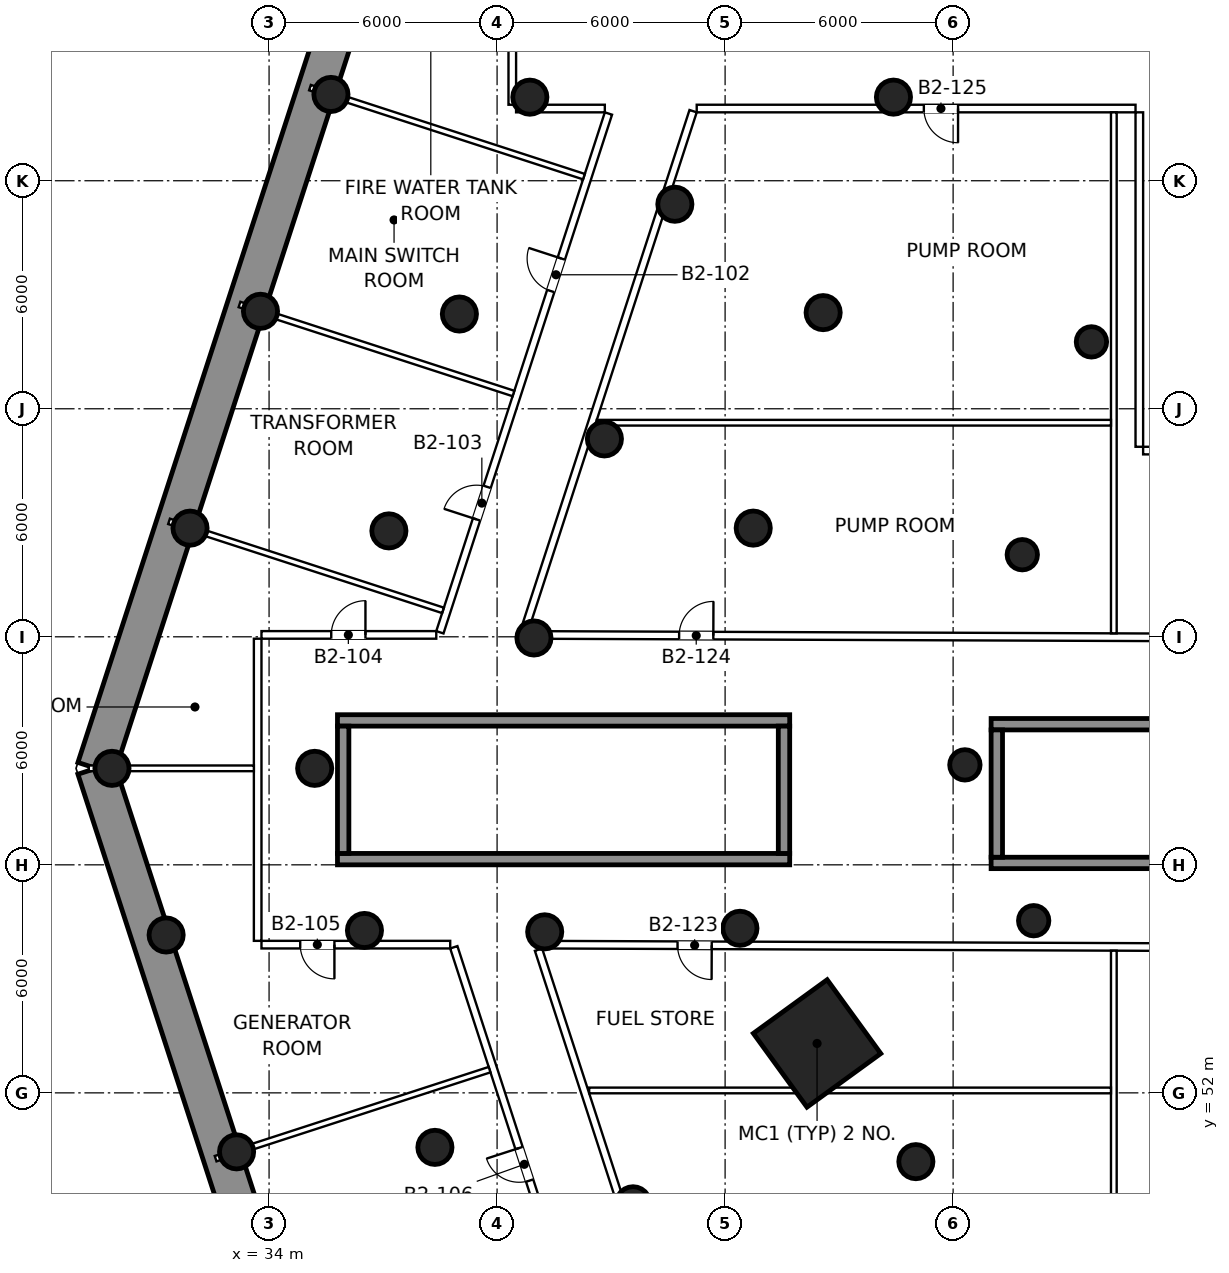
"""IFC4 building model, lengths in metres.
Left out: names, types, materials, properties, quantities, classifications, styles, units other than length and angle.
Written with IfcOpenShell. Run it as: python <this file> out.ifc"""

import sys

from ifc_helpers import new_model, si_unit, direction, frame, frame_2d, origin, origin_2d, place, context, subcontext, project, spatial, rectangle, circle, extrude, element, fill, save


model = new_model("IFC4")
c1 = context("Model", 3, precision=1e-05, world=origin(), true_north=direction((0.0, 1.0)))
c2 = subcontext(c1, "Body", "Model", "MODEL_VIEW")
j1 = project(units=[si_unit("LENGTHUNIT", "METRE"), si_unit("PLANEANGLEUNIT", "RADIAN")], contexts=[c1])
p1 = place(None, origin())
s1 = spatial("IfcSite", under=j1, at=p1, CompositionType="ELEMENT")
p2 = place(p1, origin())
s2 = spatial("IfcBuilding", under=s1, at=p2, CompositionType="ELEMENT")
p3 = place(p2, frame((0.0, 0.0, -10.0)))
s3 = spatial("IfcBuildingStorey", under=s2, at=p3, CompositionType="ELEMENT", Elevation=-10.0)
p4 = place(p3, frame((35.156, 42.963, 0.0), z_axis=(0.0, 0.0, 1.0), x_axis=(-0.309001835939, 0.951061441436, 0.0)))
e1 = element("IfcWall", 1, at=p4, inside=s3, PredefinedType="SOLIDWALL", context=c2, shape_type="SweptSolid", body=[
    extrude(rectangle(XDim=18.481, YDim=1.0, at=frame_2d((9.241, 0.0))), origin(), (0.0, 0.0, 1.0), 4.65),
])
p5 = place(p3, frame((29.446, 60.539, 0.0), z_axis=(0.0, 0.0, 1.0), x_axis=(0.309015382076, 0.951057040161, 0.0)))
e2 = element("IfcWall", 2, at=p5, inside=s3, PredefinedType="SOLIDWALL", context=c2, shape_type="SweptSolid", body=[
    extrude(rectangle(XDim=28.348, YDim=1.0, at=frame_2d((14.174, 0.0))), origin(), (0.0, 0.0, 1.0), 4.65),
])
p6 = place(p3, frame((46.39, 56.33, 0.0), z_axis=(0.0, 0.0, 1.0), x_axis=(1.0, 0.0, 0.0)))
e3 = element("IfcColumn", 3, at=p6, inside=s3, PredefinedType="COLUMN", context=c2, shape_type="SweptSolid", body=[
    extrude(circle(Radius=0.45, at=origin_2d()), origin(), (0.0, 0.0, 1.0), 5.0),
])
p7 = place(p3, frame((48.42, 53.3, 0.0), z_axis=(0.0, 0.0, 1.0), x_axis=(-0.809016994375, -0.587785252292, 0.0)))
e4 = element("IfcColumn", 4, at=p7, inside=s3, PredefinedType="COLUMN", context=c2, shape_type="SweptSolid", body=[
    extrude(rectangle(XDim=2.4, YDim=2.4, at=origin_2d()), origin(), (0.0, 0.0, 1.0), 5.0),
])
for number, where, z_axis, x_axis in (
    (5, (51.02, 50.19, 0.0), (0.0, 0.0, 1.0), (1.0, 0.0, 0.0)),
    (6, (50.43, 78.2, 0.0), (0.0, 0.0, 1.0), (1.0, 0.0, 0.0)),
    (7, (48.58, 72.53, 0.0), (0.0, 0.0, 1.0), (1.0, 0.0, 0.0)),
    (8, (46.74, 66.86, 0.0), (0.0, 0.0, 1.0), (1.0, 0.0, 0.0)),
):
    element("IfcColumn", number, at=place(p3, frame(where, z_axis=z_axis, x_axis=x_axis)), inside=s3, PredefinedType="COLUMN", context=c2, shape_type="SweptSolid", body=[
        extrude(circle(Radius=0.45, at=origin_2d()), origin(), (0.0, 0.0, 1.0), 5.0),
    ])
for number, where, z_axis, x_axis in (
    (9, (52.31, 60.63, 0.0), (0.0, 0.0, 1.0), (1.0, 0.0, 0.0)),
    (10, (54.12, 56.53, 0.0), (0.0, 0.0, 1.0), (1.0, 0.0, 0.0)),
    (11, (55.64, 71.76, 0.0), (0.0, 0.0, 1.0), (1.0, 0.0, 0.0)),
    (12, (53.82, 66.16, 0.0), (0.0, 0.0, 1.0), (1.0, 0.0, 0.0)),
):
    element("IfcColumn", number, at=place(p3, frame(where, z_axis=z_axis, x_axis=x_axis)), inside=s3, PredefinedType="COLUMN", context=c2, shape_type="SweptSolid", body=[
        extrude(circle(Radius=0.4, at=origin_2d()), origin(), (0.0, 0.0, 1.0), 5.0),
    ])
for number, where, z_axis, x_axis in (
    (13, (29.866, 60.539, 0.0), (0.0, 0.0, 1.0), (1.0, 0.0, 0.0)),
    (14, (31.291, 56.154, 0.0), (0.0, 0.0, 1.0), (1.0, 0.0, 0.0)),
    (15, (33.145, 50.448, 0.0), (0.0, 0.0, 1.0), (1.0, 0.0, 0.0)),
    (16, (35.628, 78.271, 0.0), (0.0, 0.0, 1.0), (1.0, 0.0, 0.0)),
    (17, (33.774, 72.565, 0.0), (0.0, 0.0, 1.0), (1.0, 0.0, 0.0)),
    (18, (31.92, 66.859, 0.0), (0.0, 0.0, 1.0), (1.0, 0.0, 0.0)),
    (19, (35.2, 60.539, 0.0), (0.0, 0.0, 1.0), (1.0, 0.0, 0.0)),
    (20, (36.51, 56.273, 0.0), (0.0, 0.0, 1.0), (1.0, 0.0, 0.0)),
    (21, (38.364, 50.566, 0.0), (0.0, 0.0, 1.0), (1.0, 0.0, 0.0)),
    (22, (40.862, 78.199, 0.0), (0.0, 0.0, 1.0), (1.0, 0.0, 0.0)),
    (23, (39.008, 72.493, 0.0), (0.0, 0.0, 1.0), (1.0, 0.0, 0.0)),
    (24, (37.153, 66.787, 0.0), (0.0, 0.0, 1.0), (1.0, 0.0, 0.0)),
    (25, (41.253, 56.237, 0.0), (0.0, 0.0, 1.0), (1.0, 0.0, 0.0)),
    (26, (43.578, 49.081, 0.0), (0.0, 0.0, 1.0), (1.0, 0.0, 0.0)),
    (27, (44.678, 75.382, 0.0), (0.0, 0.0, 1.0), (1.0, 0.0, 0.0)),
    (28, (42.824, 69.207, 0.0), (0.0, 0.0, 1.0), (1.0, 0.0, 0.0)),
    (29, (40.97, 63.969, 0.0), (0.0, 0.0, 1.0), (1.0, 0.0, 0.0)),
):
    element("IfcColumn", number, at=place(p3, frame(where, z_axis=z_axis, x_axis=x_axis)), inside=s3, PredefinedType="COLUMN", context=c2, shape_type="SweptSolid", body=[
        extrude(circle(Radius=0.45, at=origin_2d()), origin(), (0.0, 0.0, 1.0), 5.0),
    ])
for number, where, z_axis, x_axis in (
    (30, (53.0, 58.05, 0.0), (0.0, 0.0, 1.0), (1.0, 0.0, 0.0)),
    (31, (53.0, 61.7, 0.0), (0.0, 0.0, 1.0), (1.0, 0.0, 0.0)),
):
    element("IfcWall", number, at=place(p3, frame(where, z_axis=z_axis, x_axis=x_axis)), inside=s3, PredefinedType="SHEAR", context=c2, shape_type="SweptSolid", body=[
        extrude(rectangle(XDim=11.9, YDim=0.3, at=frame_2d((5.95, 0.0))), origin(), (0.0, 0.0, 1.0), 5.0),
    ])
p8 = place(p3, frame((53.15, 58.2, 0.0), z_axis=(0.0, 0.0, 1.0), x_axis=(0.0, 1.0, 0.0)))
e32 = element("IfcWall", 32, at=p8, inside=s3, PredefinedType="SHEAR", context=c2, shape_type="SweptSolid", body=[
    extrude(rectangle(XDim=3.35, YDim=0.3, at=frame_2d((1.675, 0.0))), origin(), (0.0, 0.0, 1.0), 5.0),
])
for number, where, z_axis, x_axis in (
    (33, (35.8, 58.15, 0.0), (0.0, 0.0, 1.0), (1.0, 0.0, 0.0)),
    (34, (35.8, 61.8, 0.0), (0.0, 0.0, 1.0), (1.0, 0.0, 0.0)),
):
    element("IfcWall", number, at=place(p3, frame(where, z_axis=z_axis, x_axis=x_axis)), inside=s3, PredefinedType="SHEAR", context=c2, shape_type="SweptSolid", body=[
        extrude(rectangle(XDim=11.9, YDim=0.3, at=frame_2d((5.95, 0.0))), origin(), (0.0, 0.0, 1.0), 5.0),
    ])
for number, where, z_axis, x_axis in (
    (35, (35.95, 58.3, 0.0), (0.0, 0.0, 1.0), (0.0, 1.0, 0.0)),
    (36, (47.55, 58.3, 0.0), (0.0, 0.0, 1.0), (0.0, 1.0, 0.0)),
):
    element("IfcWall", number, at=place(p3, frame(where, z_axis=z_axis, x_axis=x_axis)), inside=s3, PredefinedType="SHEAR", context=c2, shape_type="SweptSolid", body=[
        extrude(rectangle(XDim=3.35, YDim=0.3, at=frame_2d((1.675, 0.0))), origin(), (0.0, 0.0, 1.0), 5.0),
    ])
p9 = place(p3, frame((41.527, 47.629, 0.0), z_axis=(0.0, 0.0, 1.0), x_axis=(-0.309050865735, 0.951045510156, 0.0)))
e37 = element("IfcWall", 37, at=p9, inside=s3, PredefinedType="PARTITIONING", context=c2, shape_type="SweptSolid", body=[
    extrude(rectangle(XDim=8.624, YDim=0.2, at=frame_2d((4.312, 0.0))), origin(), (0.0, 0.0, 1.0), 4.65),
])
p10 = place(p9, frame((2.169, 0.0, 0.0)))
e38 = element("IfcOpeningElement", 38, at=p10, cuts=e37, PredefinedType="OPENING", context=c2, shape_type="SweptSolid", body=[
    extrude(rectangle(XDim=0.9, YDim=2.1, at=frame_2d((0.45, 1.05))), frame((0.0, 0.11, 0.0), z_axis=(0.0, -1.0, 0.0), x_axis=(1.0, 0.0, 0.0)), (0.0, 0.0, 1.0), 0.22),
])
p11 = place(p3, frame((38.766, 55.9, 0.0), z_axis=(0.0, 0.0, 1.0), x_axis=(-1.0, 0.0, 0.0)))
e39 = element("IfcWall", 39, at=p11, inside=s3, PredefinedType="PARTITIONING", context=c2, shape_type="SweptSolid", body=[
    extrude(rectangle(XDim=4.966, YDim=0.2, at=frame_2d((2.483, 0.0))), origin(), (0.0, 0.0, 1.0), 3.95),
])
p12 = place(p11, frame((3.047, 0.0, 0.0)))
e40 = element("IfcOpeningElement", 40, at=p12, cuts=e39, PredefinedType="OPENING", context=c2, shape_type="SweptSolid", body=[
    extrude(rectangle(XDim=0.9, YDim=2.1, at=frame_2d((0.45, 1.05))), frame((0.0, 0.11, 0.0), z_axis=(0.0, -1.0, 0.0), x_axis=(1.0, 0.0, 0.0)), (0.0, 0.0, 1.0), 0.22),
])
p13 = place(p3, frame((33.7, 56.0, 0.0), z_axis=(0.0, 0.0, 1.0), x_axis=(0.0, 1.0, 0.0)))
e41 = element("IfcWall", 41, at=p13, inside=s3, PredefinedType="PARTITIONING", context=c2, shape_type="SweptSolid", body=[
    extrude(rectangle(XDim=7.95, YDim=0.2, at=frame_2d((3.975, 0.0))), origin(), (0.0, 0.0, 1.0), 4.65),
])
p14 = place(p3, frame((33.8, 64.05, 0.0), z_axis=(0.0, 0.0, 1.0), x_axis=(1.0, 0.0, 0.0)))
e42 = element("IfcWall", 42, at=p14, inside=s3, PredefinedType="PARTITIONING", context=c2, shape_type="SweptSolid", body=[
    extrude(rectangle(XDim=4.6, YDim=0.2, at=frame_2d((2.3, 0.0))), origin(), (0.0, 0.0, 1.0), 3.95),
])
p15 = place(p14, frame((1.836, 0.0, 0.0)))
e43 = element("IfcOpeningElement", 43, at=p15, cuts=e42, PredefinedType="OPENING", context=c2, shape_type="SweptSolid", body=[
    extrude(rectangle(XDim=0.9, YDim=2.1, at=frame_2d((0.45, 1.05))), frame((0.0, 0.11, 0.0), z_axis=(0.0, -1.0, 0.0), x_axis=(1.0, 0.0, 0.0)), (0.0, 0.0, 1.0), 0.22),
])
p16 = place(p3, frame((38.495, 64.119, 0.0), z_axis=(0.0, 0.0, 1.0), x_axis=(0.309012990643, 0.951057817177, 0.0)))
e44 = element("IfcWall", 44, at=p16, inside=s3, PredefinedType="PARTITIONING", context=c2, shape_type="SweptSolid", body=[
    extrude(rectangle(XDim=14.352, YDim=0.2, at=frame_2d((7.176, 0.0))), origin(), (0.0, 0.0, 1.0), 4.65),
])
p17 = place(p16, frame((9.441, 0.0, 0.0)))
e45 = element("IfcOpeningElement", 45, at=p17, cuts=e44, PredefinedType="OPENING", context=c2, shape_type="SweptSolid", body=[
    extrude(rectangle(XDim=0.9, YDim=2.1, at=frame_2d((0.45, 1.05))), frame((0.0, 0.11, 0.0), z_axis=(0.0, -1.0, 0.0), x_axis=(1.0, 0.0, 0.0)), (0.0, 0.0, 1.0), 0.22),
])
p18 = place(p16, frame((3.124, 0.0, 0.0)))
e46 = element("IfcOpeningElement", 46, at=p18, cuts=e44, PredefinedType="OPENING", context=c2, shape_type="SweptSolid", body=[
    extrude(rectangle(XDim=0.9, YDim=2.1, at=frame_2d((0.45, 1.05))), frame((0.0, 0.11, 0.0), z_axis=(0.0, -1.0, 0.0), x_axis=(1.0, 0.0, 0.0)), (0.0, 0.0, 1.0), 0.22),
])
p19 = place(p3, frame((42.835, 77.9, 0.0), z_axis=(0.0, 0.0, 1.0), x_axis=(-1.0, 0.0, 0.0)))
e47 = element("IfcWall", 47, at=p19, inside=s3, PredefinedType="PARTITIONING", context=c2, shape_type="SweptSolid", body=[
    extrude(rectangle(XDim=2.335, YDim=0.2, at=frame_2d((1.167, 0.0))), origin(), (0.0, 0.0, 1.0), 4.65),
])
p20 = place(p3, frame((40.4, 78.0, 0.0), z_axis=(0.0, 0.0, 1.0), x_axis=(0.0, 1.0, 0.0)))
e48 = element("IfcWall", 48, at=p20, inside=s3, PredefinedType="PARTITIONING", context=c2, shape_type="SweptSolid", body=[
    extrude(rectangle(XDim=7.95, YDim=0.2, at=frame_2d((3.975, 0.0))), origin(), (0.0, 0.0, 1.0), 4.65),
])
p21 = place(p20, frame((2.74, 0.0, 0.0)))
e49 = element("IfcOpeningElement", 49, at=p21, cuts=e48, PredefinedType="OPENING", context=c2, shape_type="SweptSolid", body=[
    extrude(rectangle(XDim=0.9, YDim=2.1, at=frame_2d((0.45, 1.05))), frame((0.0, 0.11, 0.0), z_axis=(0.0, -1.0, 0.0), x_axis=(1.0, 0.0, 0.0)), (0.0, 0.0, 1.0), 0.22),
])
p22 = place(p3, frame((66.9, 55.8, 0.0), z_axis=(0.0, 0.0, 1.0), x_axis=(-0.999992570732, 0.003854670107, 0.0)))
e50 = element("IfcWall", 50, at=p22, inside=s3, PredefinedType="PARTITIONING", context=c2, shape_type="SweptSolid", body=[
    extrude(rectangle(XDim=25.715, YDim=0.2, at=frame_2d((12.857, 0.0))), origin(), (0.0, 0.0, 1.0), 3.85),
])
p23 = place(p22, frame((21.251, 0.0, 0.0)))
e51 = element("IfcOpeningElement", 51, at=p23, cuts=e50, PredefinedType="OPENING", context=c2, shape_type="SweptSolid", body=[
    extrude(rectangle(XDim=0.9, YDim=2.1, at=frame_2d((0.45, 1.05))), frame((0.0, 0.11, 0.0), z_axis=(0.0, -1.0, 0.0), x_axis=(1.0, 0.0, 0.0)), (0.0, 0.0, 1.0), 0.22),
])
p24 = place(p3, frame((41.09, 55.769, 0.0), z_axis=(0.0, 0.0, 1.0), x_axis=(0.309000124439, -0.951061997504, 0.0)))
e52 = element("IfcWall", 52, at=p24, inside=s3, PredefinedType="PARTITIONING", context=c2, shape_type="SweptSolid", body=[
    extrude(rectangle(XDim=7.194, YDim=0.2, at=frame_2d((3.597, 0.0))), origin(), (0.0, 0.0, 1.0), 3.95),
])
p25 = place(p3, frame((68.85, 68.9, 0.0), z_axis=(0.0, 0.0, 1.0), x_axis=(-1.0, 0.0, 0.0)))
e53 = element("IfcWall", 53, at=p25, inside=s3, PredefinedType="PARTITIONING", context=c2, shape_type="SweptSolid", body=[
    extrude(rectangle(XDim=11.85, YDim=0.2, at=frame_2d((5.925, 0.0))), origin(), (0.0, 0.0, 1.0), 4.65),
])
p26 = place(p25, frame((5.475, 0.0, 0.0)))
e54 = element("IfcOpeningElement", 54, at=p26, cuts=e53, PredefinedType="OPENING", context=c2, shape_type="SweptSolid", body=[
    extrude(rectangle(XDim=0.9, YDim=2.1, at=frame_2d((0.45, 1.05))), frame((0.0, 0.11, 0.0), z_axis=(0.0, -1.0, 0.0), x_axis=(1.0, 0.0, 0.0)), (0.0, 0.0, 1.0), 0.22),
])
p27 = place(p3, frame((56.9, 69.0, 0.0), z_axis=(0.0, 0.0, 1.0), x_axis=(0.0, 1.0, 0.0)))
e55 = element("IfcWall", 55, at=p27, inside=s3, PredefinedType="PARTITIONING", context=c2, shape_type="SweptSolid", body=[
    extrude(rectangle(XDim=8.8, YDim=0.2, at=frame_2d((4.4, 0.0))), origin(), (0.0, 0.0, 1.0), 3.85),
])
p28 = place(p3, frame((56.8, 77.9, 0.0), z_axis=(0.0, 0.0, 1.0), x_axis=(-1.0, 0.0, 0.0)))
e56 = element("IfcWall", 56, at=p28, inside=s3, PredefinedType="PARTITIONING", context=c2, shape_type="SweptSolid", body=[
    extrude(rectangle(XDim=11.547, YDim=0.2, at=frame_2d((5.773, 0.0))), origin(), (0.0, 0.0, 1.0), 4.65),
])
p29 = place(p28, frame((4.67, 0.0, 0.0)))
e57 = element("IfcOpeningElement", 57, at=p29, cuts=e56, PredefinedType="OPENING", context=c2, shape_type="SweptSolid", body=[
    extrude(rectangle(XDim=0.9, YDim=2.1, at=frame_2d((0.45, 1.05))), frame((0.0, 0.11, 0.0), z_axis=(0.0, -1.0, 0.0), x_axis=(1.0, 0.0, 0.0)), (0.0, 0.0, 1.0), 0.22),
])
p30 = place(p3, frame((45.158, 77.831, 0.0), z_axis=(0.0, 0.0, 1.0), x_axis=(-0.309018378218, -0.951056066656, 0.0)))
e58 = element("IfcWall", 58, at=p30, inside=s3, PredefinedType="PARTITIONING", context=c2, shape_type="SweptSolid", body=[
    extrude(rectangle(XDim=14.353, YDim=0.2, at=frame_2d((7.176, 0.0))), origin(), (0.0, 0.0, 1.0), 3.95),
])
p31 = place(p3, frame((40.817, 64.05, 0.0), z_axis=(0.0, 0.0, 1.0), x_axis=(0.999992779253, -0.003800189715, 0.0)))
e59 = element("IfcWall", 59, at=p31, inside=s3, PredefinedType="PARTITIONING", context=c2, shape_type="SweptSolid", body=[
    extrude(rectangle(XDim=26.083, YDim=0.2, at=frame_2d((13.042, 0.0))), origin(), (0.0, 0.0, 1.0), 3.75),
])
p32 = place(p31, frame((3.973, 0.0, 0.0)))
e60 = element("IfcOpeningElement", 60, at=p32, cuts=e59, PredefinedType="OPENING", context=c2, shape_type="SweptSolid", body=[
    extrude(rectangle(XDim=0.9, YDim=2.1, at=frame_2d((0.45, 1.05))), frame((0.0, 0.11, 0.0), z_axis=(0.0, -1.0, 0.0), x_axis=(1.0, 0.0, 0.0)), (0.0, 0.0, 1.0), 0.22),
])
p33 = place(p3, frame((29.256, 60.539, 0.0), z_axis=(0.0, 0.0, 1.0), x_axis=(1.0, 0.0, 0.0)))
e61 = element("IfcWall", 61, at=p33, inside=s3, PredefinedType="PARTITIONING", context=c2, shape_type="SweptSolid", body=[
    extrude(rectangle(XDim=4.344, YDim=0.15, at=frame_2d((2.172, 0.0))), origin(), (0.0, 0.0, 1.0), 4.65),
])
for number, where, z_axis, x_axis in (
    (62, (35.076, 78.45, 0.0), (0.0, 0.0, 1.0), (0.951, -0.309, 0.0)),
    (63, (33.222, 72.744, 0.0), (0.0, 0.0, 1.0), (0.951, -0.309, 0.0)),
    (64, (31.368, 67.038, 0.0), (0.0, 0.0, 1.0), (0.951, -0.309, 0.0)),
    (65, (32.594, 50.269, 0.0), (0.0, 0.0, 1.0), (0.951, 0.309, 0.0)),
):
    element("IfcWall", number, at=place(p3, frame(where, z_axis=z_axis, x_axis=x_axis)), inside=s3, PredefinedType="PARTITIONING", context=c2, shape_type="SweptSolid", body=[
        extrude(rectangle(XDim=7.58, YDim=0.15, at=frame_2d((3.79, 0.0))), origin(), (0.0, 0.0, 1.0), 3.95),
    ])
p34 = place(p3, frame((56.229, 48.542, 0.0), z_axis=(0.0, 0.0, 1.0), x_axis=(0.0, 1.0, 0.0)))
e66 = element("IfcWall", 66, at=p34, inside=s3, PredefinedType="PARTITIONING", context=c2, shape_type="SweptSolid", body=[
    extrude(rectangle(XDim=7.2, YDim=0.15, at=frame_2d((3.6, 0.0))), origin(), (0.0, 0.0, 1.0), 3.85),
])
p35 = place(p3, frame((56.229, 64.091, 0.0), z_axis=(0.0, 0.0, 1.0), x_axis=(0.0, 1.0, 0.0)))
e67 = element("IfcWall", 67, at=p35, inside=s3, PredefinedType="PARTITIONING", context=c2, shape_type="SweptSolid", body=[
    extrude(rectangle(XDim=13.709, YDim=0.15, at=frame_2d((6.854, 0.0))), origin(), (0.0, 0.0, 1.0), 3.85),
])
p36 = place(p3, frame((42.423, 52.063, 0.0), z_axis=(0.0, 0.0, 1.0), x_axis=(1.0, 0.0, 0.0)))
e68 = element("IfcWall", 68, at=p36, inside=s3, PredefinedType="PARTITIONING", context=c2, shape_type="SweptSolid", body=[
    extrude(rectangle(XDim=13.731, YDim=0.15, at=frame_2d((6.866, 0.0))), origin(), (0.0, 0.0, 1.0), 3.95),
])
p37 = place(p3, frame((42.624, 69.633, 0.0), z_axis=(0.0, 0.0, 1.0), x_axis=(1.0, 0.0, 0.0)))
e69 = element("IfcWall", 69, at=p37, inside=s3, PredefinedType="PARTITIONING", context=c2, shape_type="SweptSolid", body=[
    extrude(rectangle(XDim=13.53, YDim=0.15, at=frame_2d((6.765, 0.0))), origin(), (0.0, 0.0, 1.0), 3.85),
])
p38 = place(p17, origin())
e70 = element("IfcDoor", 70, at=p38, inside=s3, OperationType="SINGLE_SWING_RIGHT", PredefinedType="DOOR", context=c2, shape_type="SweptSolid", body=[
    extrude(rectangle(XDim=0.9, YDim=2.1, at=frame_2d((0.45, 1.05))), frame((0.0, 0.025, 0.0), z_axis=(0.0, -1.0, 0.0), x_axis=(1.0, 0.0, 0.0)), (0.0, 0.0, 1.0), 0.05),
])
fill(e45, e70)
p39 = place(p18, origin())
e71 = element("IfcDoor", 71, at=p39, inside=s3, OperationType="SINGLE_SWING_LEFT", PredefinedType="DOOR", context=c2, shape_type="SweptSolid", body=[
    extrude(rectangle(XDim=0.9, YDim=2.1, at=frame_2d((0.45, 1.05))), frame((0.0, 0.025, 0.0), z_axis=(0.0, -1.0, 0.0), x_axis=(1.0, 0.0, 0.0)), (0.0, 0.0, 1.0), 0.05),
])
fill(e46, e71)
p40 = place(p15, origin())
e72 = element("IfcDoor", 72, at=p40, inside=s3, OperationType="SINGLE_SWING_RIGHT", PredefinedType="DOOR", context=c2, shape_type="SweptSolid", body=[
    extrude(rectangle(XDim=0.9, YDim=2.1, at=frame_2d((0.45, 1.05))), frame((0.0, 0.025, 0.0), z_axis=(0.0, -1.0, 0.0), x_axis=(1.0, 0.0, 0.0)), (0.0, 0.0, 1.0), 0.05),
])
fill(e43, e72)
p41 = place(p12, origin())
e73 = element("IfcDoor", 73, at=p41, inside=s3, OperationType="SINGLE_SWING_LEFT", PredefinedType="DOOR", context=c2, shape_type="SweptSolid", body=[
    extrude(rectangle(XDim=0.9, YDim=2.1, at=frame_2d((0.45, 1.05))), frame((0.0, 0.025, 0.0), z_axis=(0.0, -1.0, 0.0), x_axis=(1.0, 0.0, 0.0)), (0.0, 0.0, 1.0), 0.05),
])
fill(e40, e73)
p42 = place(p10, origin())
e74 = element("IfcDoor", 74, at=p42, inside=s3, OperationType="SINGLE_SWING_RIGHT", PredefinedType="DOOR", context=c2, shape_type="SweptSolid", body=[
    extrude(rectangle(XDim=0.9, YDim=2.1, at=frame_2d((0.45, 1.05))), frame((0.0, 0.025, 0.0), z_axis=(0.0, -1.0, 0.0), x_axis=(1.0, 0.0, 0.0)), (0.0, 0.0, 1.0), 0.05),
])
fill(e38, e74)
p43 = place(p23, origin())
e75 = element("IfcDoor", 75, at=p43, inside=s3, OperationType="SINGLE_SWING_LEFT", PredefinedType="DOOR", context=c2, shape_type="SweptSolid", body=[
    extrude(rectangle(XDim=0.9, YDim=2.1, at=frame_2d((0.45, 1.05))), frame((0.0, 0.025, 0.0), z_axis=(0.0, -1.0, 0.0), x_axis=(1.0, 0.0, 0.0)), (0.0, 0.0, 1.0), 0.05),
])
fill(e51, e75)
p44 = place(p32, origin())
e76 = element("IfcDoor", 76, at=p44, inside=s3, OperationType="SINGLE_SWING_RIGHT", PredefinedType="DOOR", context=c2, shape_type="SweptSolid", body=[
    extrude(rectangle(XDim=0.9, YDim=2.1, at=frame_2d((0.45, 1.05))), frame((0.0, 0.025, 0.0), z_axis=(0.0, -1.0, 0.0), x_axis=(1.0, 0.0, 0.0)), (0.0, 0.0, 1.0), 0.05),
])
fill(e60, e76)
p45 = place(p29, origin())
e77 = element("IfcDoor", 77, at=p45, inside=s3, OperationType="SINGLE_SWING_LEFT", PredefinedType="DOOR", context=c2, shape_type="SweptSolid", body=[
    extrude(rectangle(XDim=0.9, YDim=2.1, at=frame_2d((0.45, 1.05))), frame((0.0, 0.025, 0.0), z_axis=(0.0, -1.0, 0.0), x_axis=(1.0, 0.0, 0.0)), (0.0, 0.0, 1.0), 0.05),
])
fill(e57, e77)
save(model, sys.argv[1])
